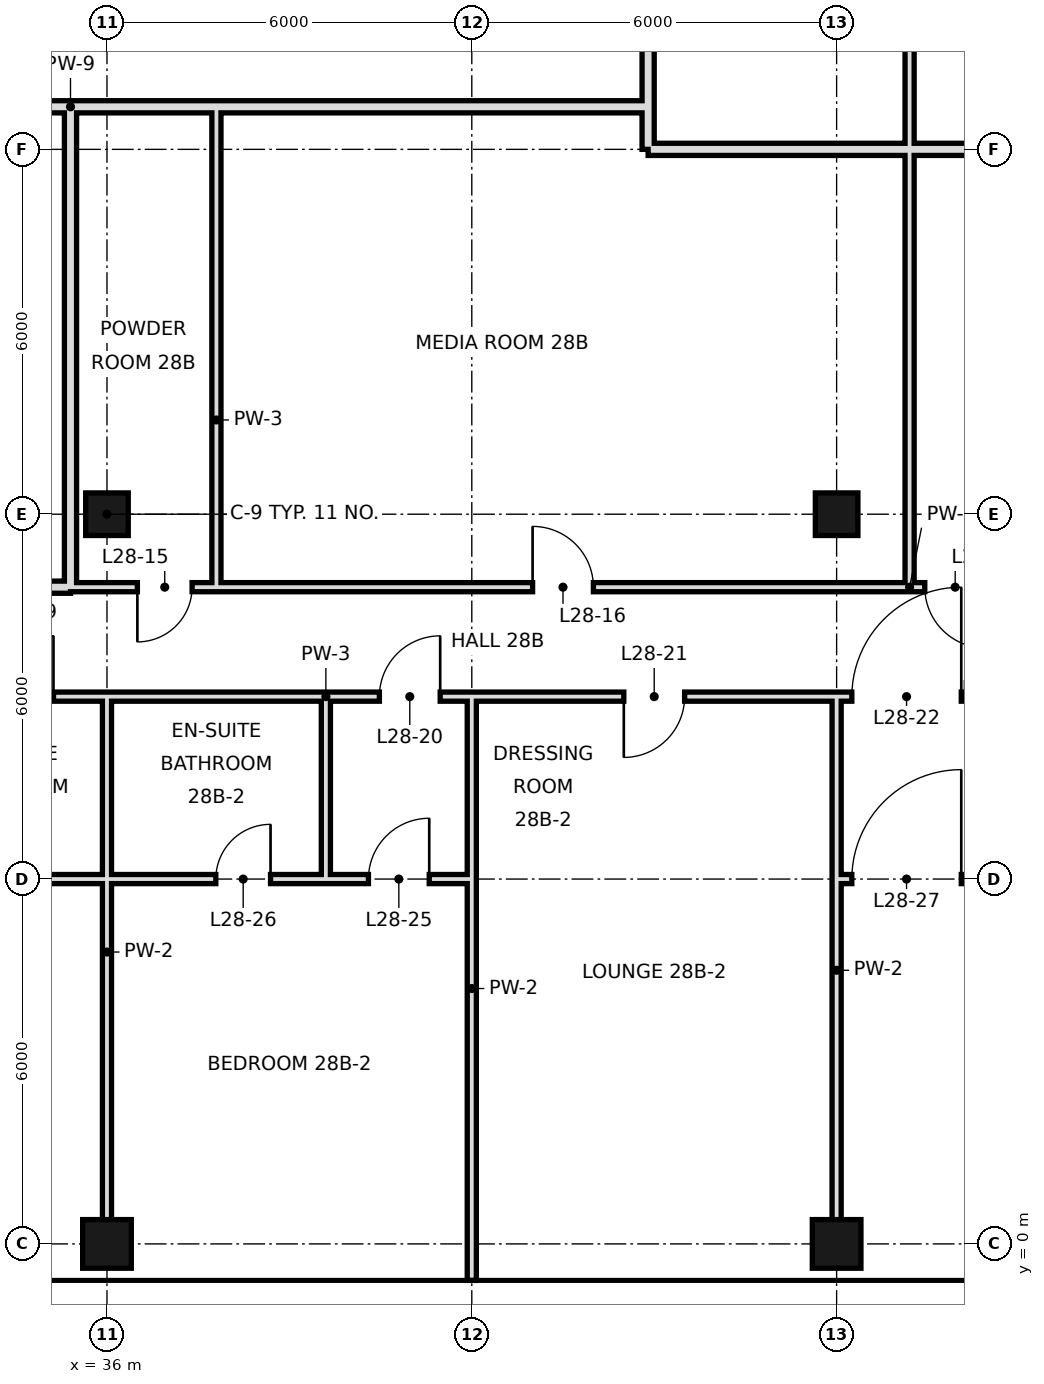
"""IFC4 building model, lengths in metres.
Left out: names, types, materials, properties, quantities, classifications, styles, units other than length and angle.
Written with IfcOpenShell. Run it as: python <this file> out.ifc"""

import sys

from ifc_helpers import new_model, si_unit, direction, frame, frame_2d, origin, origin_2d, place, context, subcontext, project, spatial, rectangle, hollow_rectangle, extrude, element, fill, save


model = new_model("IFC4")
c1 = context("Model", 3, precision=1e-05, world=origin(), true_north=direction((0.0, 1.0)))
c2 = subcontext(c1, "Body", "Model", "MODEL_VIEW")
j1 = project(units=[si_unit("LENGTHUNIT", "METRE"), si_unit("PLANEANGLEUNIT", "RADIAN")], contexts=[c1])
p1 = place(None, origin())
s1 = spatial("IfcSite", under=j1, at=p1, CompositionType="ELEMENT")
p2 = place(p1, origin())
s2 = spatial("IfcBuilding", under=s1, at=p2, CompositionType="ELEMENT")
p3 = place(p2, frame((0.0, 0.0, 126.8)))
s3 = spatial("IfcBuildingStorey", under=s2, at=p3, CompositionType="ELEMENT", Elevation=126.8)
p4 = place(p3, frame((36.0, 0.0, 0.0), z_axis=(0.0, 0.0, 1.0), x_axis=(1.0, 0.0, 0.0)))
e1 = element("IfcColumn", 1, at=p4, inside=s3, PredefinedType="COLUMN", context=c2, shape_type="SweptSolid", body=[
    extrude(hollow_rectangle(XDim=0.8, YDim=0.8, WallThickness=0.04, at=origin_2d()), origin(), (0.0, 0.0, 1.0), 3.6),
])
p5 = place(p3, frame((36.0, 12.0, 0.0), z_axis=(0.0, 0.0, 1.0), x_axis=(1.0, 0.0, 0.0)))
e2 = element("IfcColumn", 2, at=p5, inside=s3, PredefinedType="COLUMN", context=c2, shape_type="SweptSolid", body=[
    extrude(hollow_rectangle(XDim=0.7, YDim=0.7, WallThickness=0.036, at=origin_2d()), origin(), (0.0, 0.0, 1.0), 3.6),
])
p6 = place(p3, frame((48.0, 0.0, 0.0), z_axis=(0.0, 0.0, 1.0), x_axis=(1.0, 0.0, 0.0)))
e3 = element("IfcColumn", 3, at=p6, inside=s3, PredefinedType="COLUMN", context=c2, shape_type="SweptSolid", body=[
    extrude(hollow_rectangle(XDim=0.8, YDim=0.8, WallThickness=0.04, at=origin_2d()), origin(), (0.0, 0.0, 1.0), 3.6),
])
p7 = place(p3, frame((48.0, 12.0, 0.0), z_axis=(0.0, 0.0, 1.0), x_axis=(1.0, 0.0, 0.0)))
e4 = element("IfcColumn", 4, at=p7, inside=s3, PredefinedType="COLUMN", context=c2, shape_type="SweptSolid", body=[
    extrude(hollow_rectangle(XDim=0.7, YDim=0.7, WallThickness=0.036, at=origin_2d()), origin(), (0.0, 0.0, 1.0), 3.6),
])
p8 = place(p3, frame((35.4, 10.8, 0.0), z_axis=(0.0, 0.0, 1.0), x_axis=(0.0, 1.0, 0.0)))
e5 = element("IfcWall", 5, at=p8, inside=s3, PredefinedType="SOLIDWALL", context=c2, shape_type="SweptSolid", body=[
    extrude(rectangle(XDim=7.9, YDim=0.2, at=frame_2d((3.95, 0.0))), origin(), (0.0, 0.0, 1.0), 2.72),
])
p9 = place(p3, frame((36.0, 0.0, 0.0), z_axis=(0.0, 0.0, 1.0), x_axis=(0.0, 1.0, 0.0)))
e6 = element("IfcWall", 6, at=p9, inside=s3, PredefinedType="PARTITIONING", context=c2, shape_type="SweptSolid", body=[
    extrude(rectangle(XDim=6.0, YDim=0.15, at=frame_2d((3.0, 0.0))), origin(), (0.0, 0.0, 1.0), 2.72),
])
p10 = place(p3, frame((36.0, 6.0, 0.0), z_axis=(0.0, 0.0, 1.0), x_axis=(0.0, 1.0, 0.0)))
e7 = element("IfcWall", 7, at=p10, inside=s3, PredefinedType="PARTITIONING", context=c2, shape_type="SweptSolid", body=[
    extrude(rectangle(XDim=3.0, YDim=0.15, at=frame_2d((1.5, 0.0))), origin(), (0.0, 0.0, 1.0), 2.72),
])
p11 = place(p3, frame((37.8, 10.8, 0.0), z_axis=(0.0, 0.0, 1.0), x_axis=(0.0, 1.0, 0.0)))
e8 = element("IfcWall", 8, at=p11, inside=s3, PredefinedType="PARTITIONING", context=c2, shape_type="SweptSolid", body=[
    extrude(rectangle(XDim=7.9, YDim=0.15, at=frame_2d((3.95, 0.0))), origin(), (0.0, 0.0, 1.0), 3.42),
])
p12 = place(p3, frame((39.6, 6.0, 0.0), z_axis=(0.0, 0.0, 1.0), x_axis=(0.0, 1.0, 0.0)))
e9 = element("IfcWall", 9, at=p12, inside=s3, PredefinedType="PARTITIONING", context=c2, shape_type="SweptSolid", body=[
    extrude(rectangle(XDim=3.0, YDim=0.15, at=frame_2d((1.5, 0.0))), origin(), (0.0, 0.0, 1.0), 3.42),
])
p13 = place(p3, frame((42.0, -0.6, 0.0), z_axis=(0.0, 0.0, 1.0), x_axis=(0.0, 1.0, 0.0)))
e10 = element("IfcWall", 10, at=p13, inside=s3, PredefinedType="PARTITIONING", context=c2, shape_type="SweptSolid", body=[
    extrude(rectangle(XDim=9.6, YDim=0.15, at=frame_2d((4.8, 0.0))), origin(), (0.0, 0.0, 1.0), 2.72),
])
p14 = place(p3, frame((44.9, 18.7, 0.0), z_axis=(0.0, 0.0, 1.0), x_axis=(0.0, 1.0, 0.0)))
e11 = element("IfcWall", 11, at=p14, inside=s3, PredefinedType="SOLIDWALL", context=c2, shape_type="SweptSolid", body=[
    extrude(rectangle(XDim=14.9, YDim=0.2, at=frame_2d((7.45, 0.0))), origin(), (0.0, 0.0, 1.0), 2.97),
])
p15 = place(p14, frame((9.72, 0.0, 0.0)))
e12 = element("IfcOpeningElement", 12, at=p15, cuts=e11, PredefinedType="OPENING", context=c2, shape_type="SweptSolid", body=[
    extrude(rectangle(XDim=1.2, YDim=2.4, at=frame_2d((0.6, 1.2))), frame((0.0, 0.11, 0.0), z_axis=(0.0, -1.0, 0.0), x_axis=(1.0, 0.0, 0.0)), (0.0, 0.0, 1.0), 0.22),
])
p16 = place(p3, frame((44.9, 18.0, 0.0), z_axis=(0.0, 0.0, 1.0), x_axis=(0.0, 1.0, 0.0)))
e13 = element("IfcWall", 13, at=p16, inside=s3, PredefinedType="SOLIDWALL", context=c2, shape_type="SweptSolid", body=[
    extrude(rectangle(XDim=0.7, YDim=0.2, at=frame_2d((0.35, 0.0))), origin(), (0.0, 0.0, 1.0), 2.97),
])
p17 = place(p3, frame((48.0, 0.0, 0.0), z_axis=(0.0, 0.0, 1.0), x_axis=(0.0, 1.0, 0.0)))
e14 = element("IfcWall", 14, at=p17, inside=s3, PredefinedType="PARTITIONING", context=c2, shape_type="SweptSolid", body=[
    extrude(rectangle(XDim=9.0, YDim=0.15, at=frame_2d((4.5, 0.0))), origin(), (0.0, 0.0, 1.0), 2.72),
])
p18 = place(p3, frame((49.2, 10.8, 0.0), z_axis=(0.0, 0.0, 1.0), x_axis=(0.0, 1.0, 0.0)))
e15 = element("IfcWall", 15, at=p18, inside=s3, PredefinedType="PARTITIONING", context=c2, shape_type="SweptSolid", body=[
    extrude(rectangle(XDim=20.4, YDim=0.15, at=frame_2d((10.2, 0.0))), origin(), (0.0, 0.0, 1.0), 3.42),
])
p19 = place(p18, frame((17.68, 0.0, 0.0)))
e16 = element("IfcOpeningElement", 16, at=p19, cuts=e15, PredefinedType="OPENING", context=c2, shape_type="SweptSolid", body=[
    extrude(rectangle(XDim=1.0, YDim=2.4, at=frame_2d((0.5, 1.2))), frame((0.0, 0.085, 0.0), z_axis=(0.0, -1.0, 0.0), x_axis=(1.0, 0.0, 0.0)), (0.0, 0.0, 1.0), 0.17),
])
p20 = place(p18, frame((9.88, 0.0, 0.0)))
e17 = element("IfcOpeningElement", 17, at=p20, cuts=e15, PredefinedType="OPENING", context=c2, shape_type="SweptSolid", body=[
    extrude(rectangle(XDim=1.0, YDim=2.4, at=frame_2d((0.5, 1.2))), frame((0.0, 0.085, 0.0), z_axis=(0.0, -1.0, 0.0), x_axis=(1.0, 0.0, 0.0)), (0.0, 0.0, 1.0), 0.17),
])
p21 = place(p3, frame((30.0, 10.8, 0.0), z_axis=(0.0, 0.0, 1.0), x_axis=(1.0, 0.0, 0.0)))
e18 = element("IfcWall", 18, at=p21, inside=s3, PredefinedType="SOLIDWALL", context=c2, shape_type="SweptSolid", body=[
    extrude(rectangle(XDim=5.4, YDim=0.2, at=frame_2d((2.7, 0.0))), origin(), (0.0, 0.0, 1.0), 2.72),
])
p22 = place(p21, frame((1.42, 0.0, 0.0)))
e19 = element("IfcOpeningElement", 19, at=p22, cuts=e18, PredefinedType="OPENING", context=c2, shape_type="SweptSolid", body=[
    extrude(rectangle(XDim=1.0, YDim=2.4, at=frame_2d((0.5, 1.2))), frame((0.0, 0.11, 0.0), z_axis=(0.0, -1.0, 0.0), x_axis=(1.0, 0.0, 0.0)), (0.0, 0.0, 1.0), 0.22),
])
p23 = place(p3, frame((37.8, 10.8, 0.0), z_axis=(0.0, 0.0, 1.0), x_axis=(1.0, 0.0, 0.0)))
e20 = element("IfcWall", 20, at=p23, inside=s3, PredefinedType="PARTITIONING", context=c2, shape_type="SweptSolid", body=[
    extrude(rectangle(XDim=22.8, YDim=0.15, at=frame_2d((11.4, 0.0))), origin(), (0.0, 0.0, 1.0), 3.42),
])
p24 = place(p23, frame((5.2, 0.0, 0.0)))
e21 = element("IfcOpeningElement", 21, at=p24, cuts=e20, PredefinedType="OPENING", context=c2, shape_type="SweptSolid", body=[
    extrude(rectangle(XDim=1.0, YDim=2.4, at=frame_2d((0.5, 1.2))), frame((0.0, 0.085, 0.0), z_axis=(0.0, -1.0, 0.0), x_axis=(1.0, 0.0, 0.0)), (0.0, 0.0, 1.0), 0.17),
])
p25 = place(p23, frame((11.65, 0.0, 0.0)))
e22 = element("IfcOpeningElement", 22, at=p25, cuts=e20, PredefinedType="OPENING", context=c2, shape_type="SweptSolid", body=[
    extrude(rectangle(XDim=1.0, YDim=2.4, at=frame_2d((0.5, 1.2))), frame((0.0, 0.085, 0.0), z_axis=(0.0, -1.0, 0.0), x_axis=(1.0, 0.0, 0.0)), (0.0, 0.0, 1.0), 0.17),
])
p26 = place(p3, frame((35.4, 10.8, 0.0), z_axis=(0.0, 0.0, 1.0), x_axis=(1.0, 0.0, 0.0)))
e23 = element("IfcWall", 23, at=p26, inside=s3, PredefinedType="PARTITIONING", context=c2, shape_type="SweptSolid", body=[
    extrude(rectangle(XDim=2.4, YDim=0.15, at=frame_2d((1.2, 0.0))), origin(), (0.0, 0.0, 1.0), 3.42),
])
p27 = place(p26, frame((1.1, 0.0, 0.0)))
e24 = element("IfcOpeningElement", 24, at=p27, cuts=e23, PredefinedType="OPENING", context=c2, shape_type="SweptSolid", body=[
    extrude(rectangle(XDim=0.9, YDim=2.4, at=frame_2d((0.45, 1.2))), frame((0.0, 0.085, 0.0), z_axis=(0.0, -1.0, 0.0), x_axis=(1.0, 0.0, 0.0)), (0.0, 0.0, 1.0), 0.17),
])
p28 = place(p3, frame((44.9, 18.0, 0.0), z_axis=(0.0, 0.0, 1.0), x_axis=(1.0, 0.0, 0.0)))
e25 = element("IfcWall", 25, at=p28, inside=s3, PredefinedType="SOLIDWALL", context=c2, shape_type="SweptSolid", body=[
    extrude(rectangle(XDim=15.7, YDim=0.2, at=frame_2d((7.85, 0.0))), origin(), (0.0, 0.0, 1.0), 2.72),
])
p29 = place(p3, frame((35.4, 18.7, 0.0), z_axis=(0.0, 0.0, 1.0), x_axis=(1.0, 0.0, 0.0)))
e26 = element("IfcWall", 26, at=p29, inside=s3, PredefinedType="SOLIDWALL", context=c2, shape_type="SweptSolid", body=[
    extrude(rectangle(XDim=9.5, YDim=0.2, at=frame_2d((4.75, 0.0))), origin(), (0.0, 0.0, 1.0), 2.72),
])
p30 = place(p3, frame((30.0, 18.7, 0.0), z_axis=(0.0, 0.0, 1.0), x_axis=(1.0, 0.0, 0.0)))
e27 = element("IfcWall", 27, at=p30, inside=s3, PredefinedType="SOLIDWALL", context=c2, shape_type="SweptSolid", body=[
    extrude(rectangle(XDim=5.4, YDim=0.2, at=frame_2d((2.7, 0.0))), origin(), (0.0, 0.0, 1.0), 2.72),
])
p31 = place(p3, frame((32.4, 6.0, 0.0), z_axis=(0.0, 0.0, 1.0), x_axis=(1.0, 0.0, 0.0)))
e28 = element("IfcWall", 28, at=p31, inside=s3, PredefinedType="PARTITIONING", context=c2, shape_type="SweptSolid", body=[
    extrude(rectangle(XDim=3.6, YDim=0.15, at=frame_2d((1.8, 0.0))), origin(), (0.0, 0.0, 1.0), 2.97),
])
p32 = place(p31, frame((0.88, 0.0, 0.0)))
e29 = element("IfcOpeningElement", 29, at=p32, cuts=e28, PredefinedType="OPENING", context=c2, shape_type="SweptSolid", body=[
    extrude(rectangle(XDim=1.0, YDim=2.4, at=frame_2d((0.5, 1.2))), frame((0.0, 0.085, 0.0), z_axis=(0.0, -1.0, 0.0), x_axis=(1.0, 0.0, 0.0)), (0.0, 0.0, 1.0), 0.17),
])
p33 = place(p3, frame((39.6, 6.0, 0.0), z_axis=(0.0, 0.0, 1.0), x_axis=(1.0, 0.0, 0.0)))
e30 = element("IfcWall", 30, at=p33, inside=s3, PredefinedType="PARTITIONING", context=c2, shape_type="SweptSolid", body=[
    extrude(rectangle(XDim=2.4, YDim=0.15, at=frame_2d((1.2, 0.0))), origin(), (0.0, 0.0, 1.0), 2.97),
])
p34 = place(p33, frame((0.7, 0.0, 0.0)))
e31 = element("IfcOpeningElement", 31, at=p34, cuts=e30, PredefinedType="OPENING", context=c2, shape_type="SweptSolid", body=[
    extrude(rectangle(XDim=1.0, YDim=2.4, at=frame_2d((0.5, 1.2))), frame((0.0, 0.085, 0.0), z_axis=(0.0, -1.0, 0.0), x_axis=(1.0, 0.0, 0.0)), (0.0, 0.0, 1.0), 0.17),
])
p35 = place(p3, frame((48.0, 6.0, 0.0), z_axis=(0.0, 0.0, 1.0), x_axis=(1.0, 0.0, 0.0)))
e32 = element("IfcWall", 32, at=p35, inside=s3, PredefinedType="PARTITIONING", context=c2, shape_type="SweptSolid", body=[
    extrude(rectangle(XDim=12.0, YDim=0.15, at=frame_2d((6.0, 0.0))), origin(), (0.0, 0.0, 1.0), 2.72),
])
p36 = place(p35, frame((0.25, 0.0, 0.0)))
e33 = element("IfcOpeningElement", 33, at=p36, cuts=e32, PredefinedType="OPENING", context=c2, shape_type="SweptSolid", body=[
    extrude(rectangle(XDim=1.8, YDim=2.4, at=frame_2d((0.9, 1.2))), frame((0.0, 0.085, 0.0), z_axis=(0.0, -1.0, 0.0), x_axis=(1.0, 0.0, 0.0)), (0.0, 0.0, 1.0), 0.17),
])
p37 = place(p3, frame((36.0, 6.0, 0.0), z_axis=(0.0, 0.0, 1.0), x_axis=(1.0, 0.0, 0.0)))
e34 = element("IfcWall", 34, at=p37, inside=s3, PredefinedType="PARTITIONING", context=c2, shape_type="SweptSolid", body=[
    extrude(rectangle(XDim=3.6, YDim=0.15, at=frame_2d((1.8, 0.0))), origin(), (0.0, 0.0, 1.0), 2.97),
])
p38 = place(p37, frame((1.79, 0.0, 0.0)))
e35 = element("IfcOpeningElement", 35, at=p38, cuts=e34, PredefinedType="OPENING", context=c2, shape_type="SweptSolid", body=[
    extrude(rectangle(XDim=0.9, YDim=2.4, at=frame_2d((0.45, 1.2))), frame((0.0, 0.085, 0.0), z_axis=(0.0, -1.0, 0.0), x_axis=(1.0, 0.0, 0.0)), (0.0, 0.0, 1.0), 0.17),
])
p39 = place(p3, frame((32.4, 9.0, 0.0), z_axis=(0.0, 0.0, 1.0), x_axis=(1.0, 0.0, 0.0)))
e36 = element("IfcWall", 36, at=p39, inside=s3, PredefinedType="PARTITIONING", context=c2, shape_type="SweptSolid", body=[
    extrude(rectangle(XDim=3.6, YDim=0.15, at=frame_2d((1.8, 0.0))), origin(), (0.0, 0.0, 1.0), 3.42),
])
p40 = place(p39, frame((1.72, 0.0, 0.0)))
e37 = element("IfcOpeningElement", 37, at=p40, cuts=e36, PredefinedType="OPENING", context=c2, shape_type="SweptSolid", body=[
    extrude(rectangle(XDim=1.0, YDim=2.4, at=frame_2d((0.5, 1.2))), frame((0.0, 0.085, 0.0), z_axis=(0.0, -1.0, 0.0), x_axis=(1.0, 0.0, 0.0)), (0.0, 0.0, 1.0), 0.17),
])
p41 = place(p3, frame((39.6, 9.0, 0.0), z_axis=(0.0, 0.0, 1.0), x_axis=(1.0, 0.0, 0.0)))
e38 = element("IfcWall", 38, at=p41, inside=s3, PredefinedType="PARTITIONING", context=c2, shape_type="SweptSolid", body=[
    extrude(rectangle(XDim=21.0, YDim=0.15, at=frame_2d((10.5, 0.0))), origin(), (0.0, 0.0, 1.0), 3.42),
])
p42 = place(p41, frame((0.88, 0.0, 0.0)))
e39 = element("IfcOpeningElement", 39, at=p42, cuts=e38, PredefinedType="OPENING", context=c2, shape_type="SweptSolid", body=[
    extrude(rectangle(XDim=1.0, YDim=2.4, at=frame_2d((0.5, 1.2))), frame((0.0, 0.085, 0.0), z_axis=(0.0, -1.0, 0.0), x_axis=(1.0, 0.0, 0.0)), (0.0, 0.0, 1.0), 0.17),
])
p43 = place(p41, frame((4.9, 0.0, 0.0)))
e40 = element("IfcOpeningElement", 40, at=p43, cuts=e38, PredefinedType="OPENING", context=c2, shape_type="SweptSolid", body=[
    extrude(rectangle(XDim=1.0, YDim=2.4, at=frame_2d((0.5, 1.2))), frame((0.0, 0.085, 0.0), z_axis=(0.0, -1.0, 0.0), x_axis=(1.0, 0.0, 0.0)), (0.0, 0.0, 1.0), 0.17),
])
p44 = place(p41, frame((8.65, 0.0, 0.0)))
e41 = element("IfcOpeningElement", 41, at=p44, cuts=e38, PredefinedType="OPENING", context=c2, shape_type="SweptSolid", body=[
    extrude(rectangle(XDim=1.8, YDim=2.4, at=frame_2d((0.9, 1.2))), frame((0.0, 0.085, 0.0), z_axis=(0.0, -1.0, 0.0), x_axis=(1.0, 0.0, 0.0)), (0.0, 0.0, 1.0), 0.17),
])
p45 = place(p3, frame((36.0, 9.0, 0.0), z_axis=(0.0, 0.0, 1.0), x_axis=(1.0, 0.0, 0.0)))
e42 = element("IfcWall", 42, at=p45, inside=s3, PredefinedType="PARTITIONING", context=c2, shape_type="SweptSolid", body=[
    extrude(rectangle(XDim=3.6, YDim=0.15, at=frame_2d((1.8, 0.0))), origin(), (0.0, 0.0, 1.0), 3.42),
])
p46 = place(p27, frame((0.9, 0.0, 0.0), z_axis=(0.0, 0.0, 1.0), x_axis=(-1.0, 0.0, 0.0)))
e43 = element("IfcDoor", 43, at=p46, inside=s3, OperationType="SINGLE_SWING_RIGHT", PredefinedType="DOOR", context=c2, shape_type="SweptSolid", body=[
    extrude(rectangle(XDim=0.9, YDim=2.4, at=frame_2d((0.45, 1.2))), frame((0.0, 0.025, 0.0), z_axis=(0.0, -1.0, 0.0), x_axis=(1.0, 0.0, 0.0)), (0.0, 0.0, 1.0), 0.05),
])
fill(e24, e43)
p47 = place(p24, origin())
e44 = element("IfcDoor", 44, at=p47, inside=s3, OperationType="SINGLE_SWING_LEFT", PredefinedType="DOOR", context=c2, shape_type="SweptSolid", body=[
    extrude(rectangle(XDim=1.0, YDim=2.4, at=frame_2d((0.5, 1.2))), frame((0.0, 0.025, 0.0), z_axis=(0.0, -1.0, 0.0), x_axis=(1.0, 0.0, 0.0)), (0.0, 0.0, 1.0), 0.05),
])
fill(e21, e44)
p48 = place(p25, origin())
e45 = element("IfcDoor", 45, at=p48, inside=s3, OperationType="SINGLE_SWING_RIGHT", PredefinedType="DOOR", context=c2, shape_type="SweptSolid", body=[
    extrude(rectangle(XDim=1.0, YDim=2.4, at=frame_2d((0.5, 1.2))), frame((0.0, 0.025, 0.0), z_axis=(0.0, -1.0, 0.0), x_axis=(1.0, 0.0, 0.0)), (0.0, 0.0, 1.0), 0.05),
])
fill(e22, e45)
p49 = place(p40, frame((1.0, 0.0, 0.0), z_axis=(0.0, 0.0, 1.0), x_axis=(-1.0, 0.0, 0.0)))
e46 = element("IfcDoor", 46, at=p49, inside=s3, OperationType="SINGLE_SWING_LEFT", PredefinedType="DOOR", context=c2, shape_type="SweptSolid", body=[
    extrude(rectangle(XDim=1.0, YDim=2.4, at=frame_2d((0.5, 1.2))), frame((0.0, 0.025, 0.0), z_axis=(0.0, -1.0, 0.0), x_axis=(1.0, 0.0, 0.0)), (0.0, 0.0, 1.0), 0.05),
])
fill(e37, e46)
p50 = place(p42, frame((1.0, 0.0, 0.0), z_axis=(0.0, 0.0, 1.0), x_axis=(-1.0, 0.0, 0.0)))
e47 = element("IfcDoor", 47, at=p50, inside=s3, OperationType="SINGLE_SWING_LEFT", PredefinedType="DOOR", context=c2, shape_type="SweptSolid", body=[
    extrude(rectangle(XDim=1.0, YDim=2.4, at=frame_2d((0.5, 1.2))), frame((0.0, 0.025, 0.0), z_axis=(0.0, -1.0, 0.0), x_axis=(1.0, 0.0, 0.0)), (0.0, 0.0, 1.0), 0.05),
])
fill(e39, e47)
p51 = place(p43, frame((1.0, 0.0, 0.0), z_axis=(0.0, 0.0, 1.0), x_axis=(-1.0, 0.0, 0.0)))
e48 = element("IfcDoor", 48, at=p51, inside=s3, OperationType="SINGLE_SWING_RIGHT", PredefinedType="DOOR", context=c2, shape_type="SweptSolid", body=[
    extrude(rectangle(XDim=1.0, YDim=2.4, at=frame_2d((0.5, 1.2))), frame((0.0, 0.025, 0.0), z_axis=(0.0, -1.0, 0.0), x_axis=(1.0, 0.0, 0.0)), (0.0, 0.0, 1.0), 0.05),
])
fill(e40, e48)
p52 = place(p44, frame((1.8, 0.0, 0.0), z_axis=(0.0, 0.0, 1.0), x_axis=(-1.0, 0.0, 0.0)))
e49 = element("IfcDoor", 49, at=p52, inside=s3, OperationType="SINGLE_SWING_LEFT", PredefinedType="DOOR", context=c2, shape_type="SweptSolid", body=[
    extrude(rectangle(XDim=1.8, YDim=2.4, at=frame_2d((0.9, 1.2))), frame((0.0, 0.025, 0.0), z_axis=(0.0, -1.0, 0.0), x_axis=(1.0, 0.0, 0.0)), (0.0, 0.0, 1.0), 0.05),
])
fill(e41, e49)
p53 = place(p34, frame((1.0, 0.0, 0.0), z_axis=(0.0, 0.0, 1.0), x_axis=(-1.0, 0.0, 0.0)))
e50 = element("IfcDoor", 50, at=p53, inside=s3, OperationType="SINGLE_SWING_LEFT", PredefinedType="DOOR", context=c2, shape_type="SweptSolid", body=[
    extrude(rectangle(XDim=1.0, YDim=2.4, at=frame_2d((0.5, 1.2))), frame((0.0, 0.025, 0.0), z_axis=(0.0, -1.0, 0.0), x_axis=(1.0, 0.0, 0.0)), (0.0, 0.0, 1.0), 0.05),
])
fill(e31, e50)
p54 = place(p38, frame((0.9, 0.0, 0.0), z_axis=(0.0, 0.0, 1.0), x_axis=(-1.0, 0.0, 0.0)))
e51 = element("IfcDoor", 51, at=p54, inside=s3, OperationType="SINGLE_SWING_LEFT", PredefinedType="DOOR", context=c2, shape_type="SweptSolid", body=[
    extrude(rectangle(XDim=0.9, YDim=2.4, at=frame_2d((0.45, 1.2))), frame((0.0, 0.025, 0.0), z_axis=(0.0, -1.0, 0.0), x_axis=(1.0, 0.0, 0.0)), (0.0, 0.0, 1.0), 0.05),
])
fill(e35, e51)
p55 = place(p36, frame((1.8, 0.0, 0.0), z_axis=(0.0, 0.0, 1.0), x_axis=(-1.0, 0.0, 0.0)))
e52 = element("IfcDoor", 52, at=p55, inside=s3, OperationType="SINGLE_SWING_LEFT", PredefinedType="DOOR", context=c2, shape_type="SweptSolid", body=[
    extrude(rectangle(XDim=1.8, YDim=2.4, at=frame_2d((0.9, 1.2))), frame((0.0, 0.025, 0.0), z_axis=(0.0, -1.0, 0.0), x_axis=(1.0, 0.0, 0.0)), (0.0, 0.0, 1.0), 0.05),
])
fill(e33, e52)
save(model, sys.argv[1])
